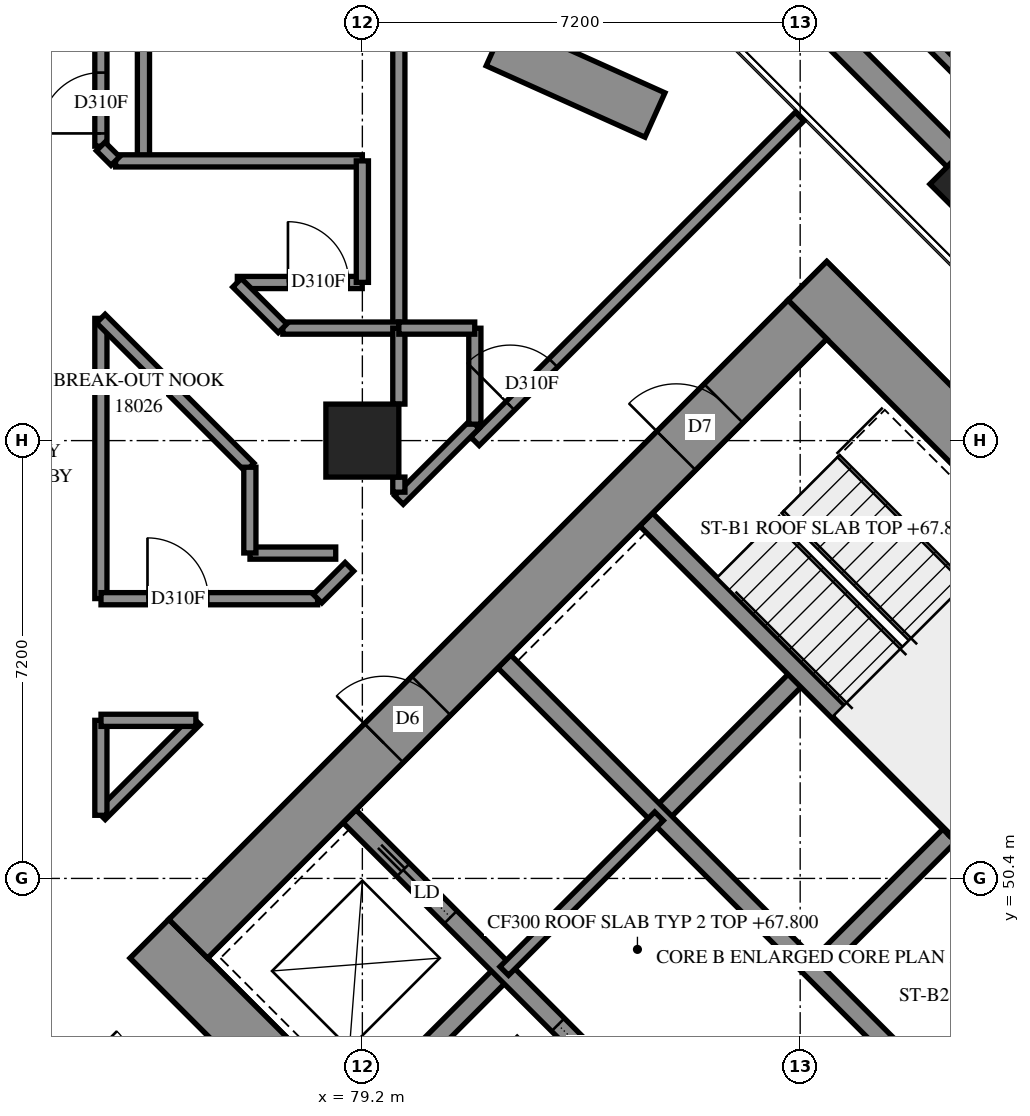
"""IFC4 building model, lengths in metres.
Left out: names, types, materials, properties, quantities, classifications, styles, units other than length and angle.
Written with IfcOpenShell. Run it as: python <this file> out.ifc"""

import sys

from ifc_helpers import new_model, si_unit, direction, frame, frame_2d, origin, origin_2d, place, context, subcontext, project, spatial, polyline, rectangle, outline, extrude, element, fill, save


model = new_model("IFC4")
c1 = context("Model", 3, precision=1e-05, world=origin(), true_north=direction((0.0, 1.0)))
c2 = subcontext(c1, "Body", "Model", "MODEL_VIEW")
j1 = project(units=[si_unit("LENGTHUNIT", "METRE"), si_unit("PLANEANGLEUNIT", "RADIAN")], contexts=[c1])
p1 = place(None, origin())
s1 = spatial("IfcSite", under=j1, at=p1, CompositionType="ELEMENT")
p2 = place(p1, origin())
s2 = spatial("IfcBuilding", under=s1, at=p2, CompositionType="ELEMENT")
p3 = place(p2, frame((0.0, 0.0, 67.8)))
s3 = spatial("IfcBuildingStorey", under=s2, at=p3, CompositionType="ELEMENT", Elevation=67.8)
for number, where, z_axis, x_axis in (
    (1, (79.2, 57.6, 0.0), (0.0, 0.0, 1.0), (1.0, 0.0, 0.0)),
    (2, (89.382, 61.818, 0.0), (0.0, 0.0, 1.0), (0.707, -0.707, 0.0)),
):
    element("IfcColumn", number, at=place(p3, frame(where, z_axis=z_axis, x_axis=x_axis)), inside=s3, PredefinedType="COLUMN", context=c2, shape_type="SweptSolid", body=[
        extrude(rectangle(XDim=1.2, YDim=1.2, at=origin_2d()), origin(), (0.0, 0.0, 1.0), 3.9),
    ])
p4 = place(p3, frame((75.7, 49.408, -0.3), z_axis=(0.0, 0.0, 1.0), x_axis=(0.7071098676, -0.7071036948, 0.0)))
e3 = element("IfcWall", 3, at=p4, inside=s3, PredefinedType="SHEAR", context=c2, shape_type="SweptSolid", body=[
    extrude(rectangle(XDim=16.2, YDim=0.9, at=frame_2d((8.1, 0.0))), origin(), (0.0, 0.0, 1.0), 3.5),
])
p5 = place(p3, frame((86.519, 60.227, -0.3), z_axis=(0.0, 0.0, 1.0), x_axis=(0.7071036948, -0.7071098676, 0.0)))
e4 = element("IfcWall", 4, at=p5, inside=s3, PredefinedType="SHEAR", context=c2, shape_type="SweptSolid", body=[
    extrude(rectangle(XDim=16.2, YDim=0.9, at=frame_2d((8.1, 0.0))), origin(), (0.0, 0.0, 1.0), 3.5),
])
p6 = place(p5, frame((10.9, 0.0, 0.3)))
e5 = element("IfcOpeningElement", 5, at=p6, cuts=e4, PredefinedType="OPENING", context=c2, shape_type="SweptSolid", body=[
    extrude(rectangle(XDim=0.8, YDim=2.1, at=frame_2d((0.4, 1.05))), frame((0.0, 0.46, 0.0), z_axis=(0.0, -1.0, 0.0), x_axis=(1.0, 0.0, 0.0)), (0.0, 0.0, 1.0), 0.92),
])
p7 = place(p3, frame((76.336, 49.408, -0.3), z_axis=(0.0, 0.0, 1.0), x_axis=(0.7071067812, 0.7071067812, 0.0)))
e6 = element("IfcWall", 6, at=p7, inside=s3, PredefinedType="SHEAR", context=c2, shape_type="SweptSolid", body=[
    extrude(rectangle(XDim=14.4, YDim=0.9, at=frame_2d((7.2, 0.0))), origin(), (0.0, 0.0, 1.0), 3.5),
])
p8 = place(p7, frame((4.55, 0.0, 0.3)))
e7 = element("IfcOpeningElement", 7, at=p8, cuts=e6, PredefinedType="OPENING", context=c2, shape_type="SweptSolid", body=[
    extrude(rectangle(XDim=1.1, YDim=2.1, at=frame_2d((0.55, 1.05))), frame((0.0, 0.46, 0.0), z_axis=(0.0, -1.0, 0.0), x_axis=(1.0, 0.0, 0.0)), (0.0, 0.0, 1.0), 0.92),
])
p9 = place(p7, frame((11.35, 0.0, 0.3)))
e8 = element("IfcOpeningElement", 8, at=p9, cuts=e6, PredefinedType="OPENING", context=c2, shape_type="SweptSolid", body=[
    extrude(rectangle(XDim=1.1, YDim=2.1, at=frame_2d((0.55, 1.05))), frame((0.0, 0.46, 0.0), z_axis=(0.0, -1.0, 0.0), x_axis=(1.0, 0.0, 0.0)), (0.0, 0.0, 1.0), 0.92),
])
p10 = place(p3, frame((87.155, 38.589, -0.3), z_axis=(0.0, 0.0, 1.0), x_axis=(0.7071067812, 0.7071067812, 0.0)))
e9 = element("IfcWall", 9, at=p10, inside=s3, PredefinedType="SHEAR", context=c2, shape_type="SweptSolid", body=[
    extrude(rectangle(XDim=14.4, YDim=0.9, at=frame_2d((7.2, 0.0))), origin(), (0.0, 0.0, 1.0), 3.5),
])
p11 = place(p10, frame((4.55, 0.0, 0.3)))
e10 = element("IfcOpeningElement", 10, at=p11, cuts=e9, PredefinedType="OPENING", context=c2, shape_type="SweptSolid", body=[
    extrude(rectangle(XDim=1.1, YDim=2.1, at=frame_2d((0.55, 1.05))), frame((0.0, 0.46, 0.0), z_axis=(0.0, -1.0, 0.0), x_axis=(1.0, 0.0, 0.0)), (0.0, 0.0, 1.0), 0.92),
])
p12 = place(p10, frame((11.35, 0.0, 0.3)))
e11 = element("IfcOpeningElement", 11, at=p12, cuts=e9, PredefinedType="OPENING", context=c2, shape_type="SweptSolid", body=[
    extrude(rectangle(XDim=1.1, YDim=2.1, at=frame_2d((0.55, 1.05))), frame((0.0, 0.46, 0.0), z_axis=(0.0, -1.0, 0.0), x_axis=(1.0, 0.0, 0.0)), (0.0, 0.0, 1.0), 0.92),
])
for number, where, z_axis, x_axis in (
    (12, (79.2, 46.544, 0.0), (0.0, 0.0, 1.0), (0.707, 0.707, 0.0)),
    (13, (84.079, 51.423, 0.0), (0.0, 0.0, 1.0), (0.707, 0.707, 0.0)),
):
    element("IfcWall", number, at=place(p3, frame(where, z_axis=z_axis, x_axis=x_axis)), inside=s3, PredefinedType="SOLIDWALL", context=c2, shape_type="SweptSolid", body=[
        extrude(rectangle(XDim=3.3, YDim=0.3, at=frame_2d((1.65, 0.0))), origin(), (0.0, 0.0, 1.0), 3.9),
    ])
p13 = place(p3, frame((86.625, 48.878, 0.0), z_axis=(0.0, 0.0, 1.0), x_axis=(0.7071067812, 0.7071067812, 0.0)))
e14 = element("IfcWall", 14, at=p13, inside=s3, PredefinedType="SOLIDWALL", context=c2, shape_type="SweptSolid", body=[
    extrude(rectangle(XDim=3.3, YDim=0.3, at=frame_2d((1.65, 0.0))), origin(), (0.0, 0.0, 1.0), 3.9),
])
p14 = place(p3, frame((78.988, 51.423, 0.0), z_axis=(0.0, 0.0, 1.0), x_axis=(0.7071067812, -0.7071067812, 0.0)))
e15 = element("IfcWall", 15, at=p14, inside=s3, PredefinedType="SOLIDWALL", context=c2, shape_type="SweptSolid", body=[
    extrude(rectangle(XDim=14.4, YDim=0.3, at=frame_2d((7.2, 0.0))), origin(), (0.0, 0.0, 1.0), 3.9),
])
p15 = place(p14, frame((1.25, 0.0, 0.0)))
e16 = element("IfcOpeningElement", 16, at=p15, cuts=e15, PredefinedType="OPENING", context=c2, shape_type="SweptSolid", body=[
    extrude(rectangle(XDim=1.1, YDim=2.1, at=frame_2d((0.55, 1.05))), frame((0.0, 0.16, 0.0), z_axis=(0.0, -1.0, 0.0), x_axis=(1.0, 0.0, 0.0)), (0.0, 0.0, 1.0), 0.32),
])
p16 = place(p14, frame((4.85, 0.0, 0.0)))
e17 = element("IfcOpeningElement", 17, at=p16, cuts=e15, PredefinedType="OPENING", context=c2, shape_type="SweptSolid", body=[
    extrude(rectangle(XDim=1.1, YDim=2.1, at=frame_2d((0.55, 1.05))), frame((0.0, 0.16, 0.0), z_axis=(0.0, -1.0, 0.0), x_axis=(1.0, 0.0, 0.0)), (0.0, 0.0, 1.0), 0.32),
])
p17 = place(p14, frame((8.45, 0.0, 0.0)))
e18 = element("IfcOpeningElement", 18, at=p17, cuts=e15, PredefinedType="OPENING", context=c2, shape_type="SweptSolid", body=[
    extrude(rectangle(XDim=1.1, YDim=2.1, at=frame_2d((0.55, 1.05))), frame((0.0, 0.16, 0.0), z_axis=(0.0, -1.0, 0.0), x_axis=(1.0, 0.0, 0.0)), (0.0, 0.0, 1.0), 0.32),
])
p18 = place(p14, frame((12.05, 0.0, 0.0)))
e19 = element("IfcOpeningElement", 19, at=p18, cuts=e15, PredefinedType="OPENING", context=c2, shape_type="SweptSolid", body=[
    extrude(rectangle(XDim=1.1, YDim=2.1, at=frame_2d((0.55, 1.05))), frame((0.0, 0.16, 0.0), z_axis=(0.0, -1.0, 0.0), x_axis=(1.0, 0.0, 0.0)), (0.0, 0.0, 1.0), 0.32),
])
p19 = place(p3, frame((81.534, 53.969, 0.0), z_axis=(0.0, 0.0, 1.0), x_axis=(0.707103309, -0.7071102534, 0.0)))
e20 = element("IfcWall", 20, at=p19, inside=s3, PredefinedType="SOLIDWALL", context=c2, shape_type="SweptSolid", body=[
    extrude(rectangle(XDim=14.4, YDim=0.3, at=frame_2d((7.2, 0.0))), origin(), (0.0, 0.0, 1.0), 3.9),
])
p20 = place(p19, frame((12.05, 0.0, 0.0)))
e21 = element("IfcOpeningElement", 21, at=p20, cuts=e20, PredefinedType="OPENING", context=c2, shape_type="SweptSolid", body=[
    extrude(rectangle(XDim=1.1, YDim=2.1, at=frame_2d((0.55, 1.05))), frame((0.0, 0.16, 0.0), z_axis=(0.0, -1.0, 0.0), x_axis=(1.0, 0.0, 0.0)), (0.0, 0.0, 1.0), 0.32),
])
for number, where, z_axis, x_axis in (
    (22, (83.867, 56.302, 0.0), (0.0, 0.0, 1.0), (0.707, -0.707, 0.0)),
    (23, (88.958, 51.211, 0.0), (0.0, 0.0, 1.0), (0.707, -0.707, 0.0)),
):
    element("IfcWall", number, at=place(p3, frame(where, z_axis=z_axis, x_axis=x_axis)), inside=s3, PredefinedType="SOLIDWALL", context=c2, shape_type="SweptSolid", body=[
        extrude(rectangle(XDim=7.2, YDim=0.3, at=frame_2d((3.6, 0.0))), origin(), (0.0, 0.0, 1.0), 3.9),
    ])
p21 = place(p3, frame((88.958, 51.211, 0.0), z_axis=(0.0, 0.0, 1.0), x_axis=(0.7071067812, 0.7071067812, 0.0)))
e24 = element("IfcWall", 24, at=p21, inside=s3, PredefinedType="SOLIDWALL", context=c2, shape_type="SweptSolid", body=[
    extrude(rectangle(XDim=4.2, YDim=0.3, at=frame_2d((2.1, 0.0))), origin(), (0.0, 0.0, 1.0), 3.9),
])
p22 = place(p3, frame((84.012, 62.954, 0.0), z_axis=(0.0, 0.0, 1.0), x_axis=(-0.9121102307, 0.4099450292, 0.0)))
e25 = element("IfcWall", 25, at=p22, inside=s3, PredefinedType="SOLIDWALL", context=c2, shape_type="SweptSolid", body=[
    extrude(rectangle(XDim=2.864, YDim=0.8, at=frame_2d((1.432, 0.0))), origin(), (0.0, 0.0, 1.0), 0.65),
])
p23 = place(p3, frame((112.929, 39.756, 0.0), z_axis=(0.0, 0.0, 1.0), x_axis=(-0.7071067812, 0.7071067812, 0.0)))
e26 = element("IfcWall", 26, at=p23, inside=s3, PredefinedType="SOLIDWALL", context=c2, shape_type="SweptSolid", body=[
    extrude(outline(polyline([(-0.1, -0.1), (47.126, -0.1), (47.044, 0.1), (0.1, 0.1), (-0.1, -0.1)])), origin(), (0.0, 0.0, 1.0), 4.2),
])
p24 = place(p3, frame((81.534, 48.878, 0.0), z_axis=(0.0, 0.0, 1.0), x_axis=(0.707092892, 0.7071206701, 0.0)))
e27 = element("IfcWall", 27, at=p24, inside=s3, PredefinedType="PARTITIONING", context=c2, shape_type="SweptSolid", body=[
    extrude(rectangle(XDim=3.6, YDim=0.2, at=frame_2d((1.8, 0.0))), origin(), (0.0, 0.0, 1.0), 3.9),
])
p25 = place(p3, frame((75.6, 62.2, 0.0), z_axis=(0.0, 0.0, 1.0), x_axis=(0.0, 1.0, 0.0)))
e28 = element("IfcWall", 28, at=p25, inside=s3, PredefinedType="PARTITIONING", context=c2, shape_type="SweptSolid", body=[
    extrude(rectangle(XDim=8.47, YDim=0.2, at=frame_2d((4.235, 0.0))), origin(), (0.0, 0.0, 1.0), 3.9),
])
p26 = place(p3, frame((81.051, 57.589, 0.0), z_axis=(0.0, 0.0, 1.0), x_axis=(0.7071067812, 0.7071067812, 0.0)))
e29 = element("IfcWall", 29, at=p26, inside=s3, PredefinedType="PARTITIONING", context=c2, shape_type="SweptSolid", body=[
    extrude(rectangle(XDim=7.552, YDim=0.2, at=frame_2d((3.776, 0.0))), origin(), (0.0, 0.0, 1.0), 3.9),
])
p27 = place(p26, frame((0.823, 0.0, 0.0)))
e30 = element("IfcOpeningElement", 30, at=p27, cuts=e29, PredefinedType="OPENING", context=c2, shape_type="SweptSolid", body=[
    extrude(rectangle(XDim=1.0, YDim=2.1, at=frame_2d((0.5, 1.05))), frame((0.0, 0.11, 0.0), z_axis=(0.0, -1.0, 0.0), x_axis=(1.0, 0.0, 0.0)), (0.0, 0.0, 1.0), 0.22),
])
p28 = place(p3, frame((74.9, 62.442, 0.0), z_axis=(0.0, 0.0, 1.0), x_axis=(0.0, 1.0, 0.0)))
e31 = element("IfcWall", 31, at=p28, inside=s3, PredefinedType="PARTITIONING", context=c2, shape_type="SweptSolid", body=[
    extrude(rectangle(XDim=5.258, YDim=0.2, at=frame_2d((2.629, 0.0))), origin(), (0.0, 0.0, 1.0), 3.9),
])
p29 = place(p28, frame((0.209, 0.0, 0.0)))
e32 = element("IfcOpeningElement", 32, at=p29, cuts=e31, PredefinedType="OPENING", context=c2, shape_type="SweptSolid", body=[
    extrude(rectangle(XDim=1.0, YDim=2.1, at=frame_2d((0.5, 1.05))), frame((0.0, 0.11, 0.0), z_axis=(0.0, -1.0, 0.0), x_axis=(1.0, 0.0, 0.0)), (0.0, 0.0, 1.0), 0.22),
])
p30 = place(p3, frame((79.8, 59.45, 0.0), z_axis=(0.0, 0.0, 1.0), x_axis=(0.0, 1.0, 0.0)))
e33 = element("IfcWall", 33, at=p30, inside=s3, PredefinedType="PARTITIONING", context=c2, shape_type="SweptSolid", body=[
    extrude(rectangle(XDim=4.75, YDim=0.2, at=frame_2d((2.375, 0.0))), origin(), (0.0, 0.0, 1.0), 3.9),
])
p31 = place(p3, frame((74.9, 55.002, 0.0), z_axis=(0.0, 0.0, 1.0), x_axis=(0.0, 1.0, 0.0)))
e34 = element("IfcWall", 34, at=p31, inside=s3, PredefinedType="PARTITIONING", context=c2, shape_type="SweptSolid", body=[
    extrude(rectangle(XDim=4.608, YDim=0.2, at=frame_2d((2.304, 0.0))), origin(), (0.0, 0.0, 1.0), 3.9),
])
p32 = place(p3, frame((75.142, 62.2, 0.0), z_axis=(0.0, 0.0, 1.0), x_axis=(1.0, 0.0, 0.0)))
e35 = element("IfcWall", 35, at=p32, inside=s3, PredefinedType="PARTITIONING", context=c2, shape_type="SweptSolid", body=[
    extrude(rectangle(XDim=4.058, YDim=0.2, at=frame_2d((2.029, 0.0))), origin(), (0.0, 0.0, 1.0), 3.9),
])
p33 = place(p3, frame((74.902, 55.0, 0.0), z_axis=(0.0, 0.0, 1.0), x_axis=(1.0, 0.0, 0.0)))
e36 = element("IfcWall", 36, at=p33, inside=s3, PredefinedType="PARTITIONING", context=c2, shape_type="SweptSolid", body=[
    extrude(rectangle(XDim=3.562, YDim=0.2, at=frame_2d((1.781, 0.0))), origin(), (0.0, 0.0, 1.0), 3.9),
])
p34 = place(p33, frame((0.764, 0.0, 0.0)))
e37 = element("IfcOpeningElement", 37, at=p34, cuts=e36, PredefinedType="OPENING", context=c2, shape_type="SweptSolid", body=[
    extrude(rectangle(XDim=1.0, YDim=2.1, at=frame_2d((0.5, 1.05))), frame((0.0, 0.11, 0.0), z_axis=(0.0, -1.0, 0.0), x_axis=(1.0, 0.0, 0.0)), (0.0, 0.0, 1.0), 0.22),
])
p35 = place(p3, frame((74.899, 59.607, 0.0), z_axis=(0.0, 0.0, 1.0), x_axis=(0.7071067812, -0.7071067812, 0.0)))
e38 = element("IfcWall", 38, at=p35, inside=s3, PredefinedType="PARTITIONING", context=c2, shape_type="SweptSolid", body=[
    extrude(rectangle(XDim=3.462, YDim=0.2, at=frame_2d((1.731, 0.0))), origin(), (0.0, 0.0, 1.0), 3.9),
])
p36 = place(p3, frame((74.901, 51.439, 0.0), z_axis=(0.0, 0.0, 1.0), x_axis=(0.7071067812, 0.7071067812, 0.0)))
e39 = element("IfcWall", 39, at=p36, inside=s3, PredefinedType="PARTITIONING", context=c2, shape_type="SweptSolid", body=[
    extrude(rectangle(XDim=2.206, YDim=0.2, at=frame_2d((1.103, 0.0))), origin(), (0.0, 0.0, 1.0), 3.9),
])
p37 = place(p3, frame((77.144, 60.2, 0.0), z_axis=(0.0, 0.0, 1.0), x_axis=(1.0, 0.0, 0.0)))
e40 = element("IfcWall", 40, at=p37, inside=s3, PredefinedType="PARTITIONING", context=c2, shape_type="SweptSolid", body=[
    extrude(rectangle(XDim=2.054, YDim=0.2, at=frame_2d((1.027, 0.0))), origin(), (0.0, 0.0, 1.0), 3.9),
])
p38 = place(p37, frame((0.832, 0.0, 0.0)))
e41 = element("IfcOpeningElement", 41, at=p38, cuts=e40, PredefinedType="OPENING", context=c2, shape_type="SweptSolid", body=[
    extrude(rectangle(XDim=1.0, YDim=2.1, at=frame_2d((0.5, 1.05))), frame((0.0, 0.11, 0.0), z_axis=(0.0, -1.0, 0.0), x_axis=(1.0, 0.0, 0.0)), (0.0, 0.0, 1.0), 0.22),
])
p39 = place(p3, frame((79.2, 60.202, 0.0), z_axis=(0.0, 0.0, 1.0), x_axis=(0.0, 1.0, 0.0)))
e42 = element("IfcWall", 42, at=p39, inside=s3, PredefinedType="PARTITIONING", context=c2, shape_type="SweptSolid", body=[
    extrude(rectangle(XDim=1.998, YDim=0.2, at=frame_2d((0.999, 0.0))), origin(), (0.0, 0.0, 1.0), 3.9),
])
p40 = place(p3, frame((77.892, 59.45, 0.0), z_axis=(0.0, 0.0, 1.0), x_axis=(1.0, 0.0, 0.0)))
e43 = element("IfcWall", 43, at=p40, inside=s3, PredefinedType="PARTITIONING", context=c2, shape_type="SweptSolid", body=[
    extrude(rectangle(XDim=1.908, YDim=0.2, at=frame_2d((0.954, 0.0))), origin(), (0.0, 0.0, 1.0), 3.9),
])
p41 = place(p3, frame((79.802, 56.623, 0.0), z_axis=(0.0, 0.0, 1.0), x_axis=(0.7071067812, 0.7071067812, 0.0)))
e44 = element("IfcWall", 44, at=p41, inside=s3, PredefinedType="PARTITIONING", context=c2, shape_type="SweptSolid", body=[
    extrude(rectangle(XDim=1.765, YDim=0.2, at=frame_2d((0.882, 0.0))), origin(), (0.0, 0.0, 1.0), 3.9),
])
p42 = place(p3, frame((81.05, 57.87, 0.0), z_axis=(0.0, 0.0, 1.0), x_axis=(0.0, 1.0, 0.0)))
e45 = element("IfcWall", 45, at=p42, inside=s3, PredefinedType="PARTITIONING", context=c2, shape_type="SweptSolid", body=[
    extrude(rectangle(XDim=1.578, YDim=0.2, at=frame_2d((0.789, 0.0))), origin(), (0.0, 0.0, 1.0), 3.9),
])
p43 = place(p3, frame((74.9, 51.438, 0.0), z_axis=(0.0, 0.0, 1.0), x_axis=(0.0, 1.0, 0.0)))
e46 = element("IfcWall", 46, at=p43, inside=s3, PredefinedType="PARTITIONING", context=c2, shape_type="SweptSolid", body=[
    extrude(rectangle(XDim=1.562, YDim=0.2, at=frame_2d((0.781, 0.0))), origin(), (0.0, 0.0, 1.0), 3.9),
])
p44 = place(p3, frame((74.902, 53.0, 0.0), z_axis=(0.0, 0.0, 1.0), x_axis=(1.0, 0.0, 0.0)))
e47 = element("IfcWall", 47, at=p44, inside=s3, PredefinedType="PARTITIONING", context=c2, shape_type="SweptSolid", body=[
    extrude(rectangle(XDim=1.56, YDim=0.2, at=frame_2d((0.78, 0.0))), origin(), (0.0, 0.0, 1.0), 3.9),
])
for number, where, z_axis, x_axis in (
    (48, (77.352, 55.75, 0.0), (0.0, 0.0, 1.0), (1.0, 0.0, 0.0)),
    (49, (77.35, 55.752, 0.0), (0.0, 0.0, 1.0), (0.0, 1.0, 0.0)),
):
    element("IfcWall", number, at=place(p3, frame(where, z_axis=z_axis, x_axis=x_axis)), inside=s3, PredefinedType="PARTITIONING", context=c2, shape_type="SweptSolid", body=[
        extrude(rectangle(XDim=1.41, YDim=0.2, at=frame_2d((0.705, 0.0))), origin(), (0.0, 0.0, 1.0), 3.9),
    ])
p45 = place(p3, frame((79.8, 58.2, 0.0), z_axis=(0.0, 0.0, 1.0), x_axis=(0.0, 1.0, 0.0)))
e50 = element("IfcWall", 50, at=p45, inside=s3, PredefinedType="PARTITIONING", context=c2, shape_type="SweptSolid", body=[
    extrude(rectangle(XDim=1.25, YDim=0.2, at=frame_2d((0.625, 0.0))), origin(), (0.0, 0.0, 1.0), 3.9),
])
p46 = place(p3, frame((79.8, 59.45, 0.0), z_axis=(0.0, 0.0, 1.0), x_axis=(1.0, 0.0, 0.0)))
e51 = element("IfcWall", 51, at=p46, inside=s3, PredefinedType="PARTITIONING", context=c2, shape_type="SweptSolid", body=[
    extrude(rectangle(XDim=1.248, YDim=0.2, at=frame_2d((0.624, 0.0))), origin(), (0.0, 0.0, 1.0), 3.9),
])
p47 = place(p3, frame((77.139, 60.195, 0.0), z_axis=(0.0, 0.0, 1.0), x_axis=(0.7071067812, -0.7071067812, 0.0)))
e52 = element("IfcWall", 52, at=p47, inside=s3, PredefinedType="PARTITIONING", context=c2, shape_type="SweptSolid", body=[
    extrude(rectangle(XDim=1.058, YDim=0.2, at=frame_2d((0.529, 0.0))), origin(), (0.0, 0.0, 1.0), 3.9),
])
p48 = place(p3, frame((78.463, 55.001, 0.0), z_axis=(0.0, 0.0, 1.0), x_axis=(0.7071067812, 0.7071067812, 0.0)))
e53 = element("IfcWall", 53, at=p48, inside=s3, PredefinedType="PARTITIONING", context=c2, shape_type="SweptSolid", body=[
    extrude(rectangle(XDim=0.741, YDim=0.2, at=frame_2d((0.37, 0.0))), origin(), (0.0, 0.0, 1.0), 3.9),
])
p49 = place(p3, frame((79.8, 56.752, 0.0), z_axis=(0.0, 0.0, 1.0), x_axis=(0.0, 1.0, 0.0)))
e54 = element("IfcWall", 54, at=p49, inside=s3, PredefinedType="PARTITIONING", context=c2, shape_type="SweptSolid", body=[
    extrude(rectangle(XDim=0.248, YDim=0.2, at=frame_2d((0.124, 0.0))), origin(), (0.0, 0.0, 1.0), 3.9),
])
p50 = place(p3, frame((74.897, 62.437, 0.0), z_axis=(0.0, 0.0, 1.0), x_axis=(0.7071067812, -0.7071067812, 0.0)))
e55 = element("IfcWall", 55, at=p50, inside=s3, PredefinedType="PARTITIONING", context=c2, shape_type="SweptSolid", body=[
    extrude(rectangle(XDim=0.339, YDim=0.2, at=frame_2d((0.17, 0.0))), origin(), (0.0, 0.0, 1.0), 3.9),
])
p51 = place(p8, origin())
e56 = element("IfcDoor", 56, at=p51, inside=s3, OperationType="DOUBLE_DOOR_SINGLE_SWING", PredefinedType="DOOR", context=c2, shape_type="SweptSolid", body=[
    extrude(rectangle(XDim=1.1, YDim=2.1, at=frame_2d((0.55, 1.05))), frame((0.0, 0.025, 0.0), z_axis=(0.0, -1.0, 0.0), x_axis=(1.0, 0.0, 0.0)), (0.0, 0.0, 1.0), 0.05),
])
fill(e7, e56)
p52 = place(p9, origin())
e57 = element("IfcDoor", 57, at=p52, inside=s3, OperationType="SINGLE_SWING_LEFT", PredefinedType="DOOR", context=c2, shape_type="SweptSolid", body=[
    extrude(rectangle(XDim=1.1, YDim=2.1, at=frame_2d((0.55, 1.05))), frame((0.0, 0.025, 0.0), z_axis=(0.0, -1.0, 0.0), x_axis=(1.0, 0.0, 0.0)), (0.0, 0.0, 1.0), 0.05),
])
fill(e8, e57)
p53 = place(p15, origin())
e58 = element("IfcDoor", 58, at=p53, inside=s3, OperationType="SLIDING_TO_LEFT", PredefinedType="DOOR", context=c2, shape_type="SweptSolid", body=[
    extrude(rectangle(XDim=1.1, YDim=2.1, at=frame_2d((0.55, 1.05))), frame((0.0, 0.025, 0.0), z_axis=(0.0, -1.0, 0.0), x_axis=(1.0, 0.0, 0.0)), (0.0, 0.0, 1.0), 0.05),
])
fill(e16, e58)
p54 = place(p16, origin())
e59 = element("IfcDoor", 59, at=p54, inside=s3, OperationType="SLIDING_TO_RIGHT", PredefinedType="DOOR", context=c2, shape_type="SweptSolid", body=[
    extrude(rectangle(XDim=1.1, YDim=2.1, at=frame_2d((0.55, 1.05))), frame((0.0, 0.025, 0.0), z_axis=(0.0, -1.0, 0.0), x_axis=(1.0, 0.0, 0.0)), (0.0, 0.0, 1.0), 0.05),
])
fill(e17, e59)
p55 = place(p34, origin())
e60 = element("IfcDoor", 60, at=p55, inside=s3, OperationType="SINGLE_SWING_LEFT", PredefinedType="DOOR", context=c2, shape_type="SweptSolid", body=[
    extrude(rectangle(XDim=1.0, YDim=2.1, at=frame_2d((0.5, 1.05))), frame((0.0, 0.025, 0.0), z_axis=(0.0, -1.0, 0.0), x_axis=(1.0, 0.0, 0.0)), (0.0, 0.0, 1.0), 0.05),
])
fill(e37, e60)
p56 = place(p29, origin())
e61 = element("IfcDoor", 61, at=p56, inside=s3, OperationType="SINGLE_SWING_RIGHT", PredefinedType="DOOR", context=c2, shape_type="SweptSolid", body=[
    extrude(rectangle(XDim=1.0, YDim=2.1, at=frame_2d((0.5, 1.05))), frame((0.0, 0.025, 0.0), z_axis=(0.0, -1.0, 0.0), x_axis=(1.0, 0.0, 0.0)), (0.0, 0.0, 1.0), 0.05),
])
fill(e32, e61)
p57 = place(p38, origin())
e62 = element("IfcDoor", 62, at=p57, inside=s3, OperationType="SINGLE_SWING_LEFT", PredefinedType="DOOR", context=c2, shape_type="SweptSolid", body=[
    extrude(rectangle(XDim=1.0, YDim=2.1, at=frame_2d((0.5, 1.05))), frame((0.0, 0.025, 0.0), z_axis=(0.0, -1.0, 0.0), x_axis=(1.0, 0.0, 0.0)), (0.0, 0.0, 1.0), 0.05),
])
fill(e41, e62)
p58 = place(p27, origin())
e63 = element("IfcDoor", 63, at=p58, inside=s3, OperationType="SINGLE_SWING_RIGHT", PredefinedType="DOOR", context=c2, shape_type="SweptSolid", body=[
    extrude(rectangle(XDim=1.0, YDim=2.1, at=frame_2d((0.5, 1.05))), frame((0.0, 0.025, 0.0), z_axis=(0.0, -1.0, 0.0), x_axis=(1.0, 0.0, 0.0)), (0.0, 0.0, 1.0), 0.05),
])
fill(e30, e63)
save(model, sys.argv[1])
